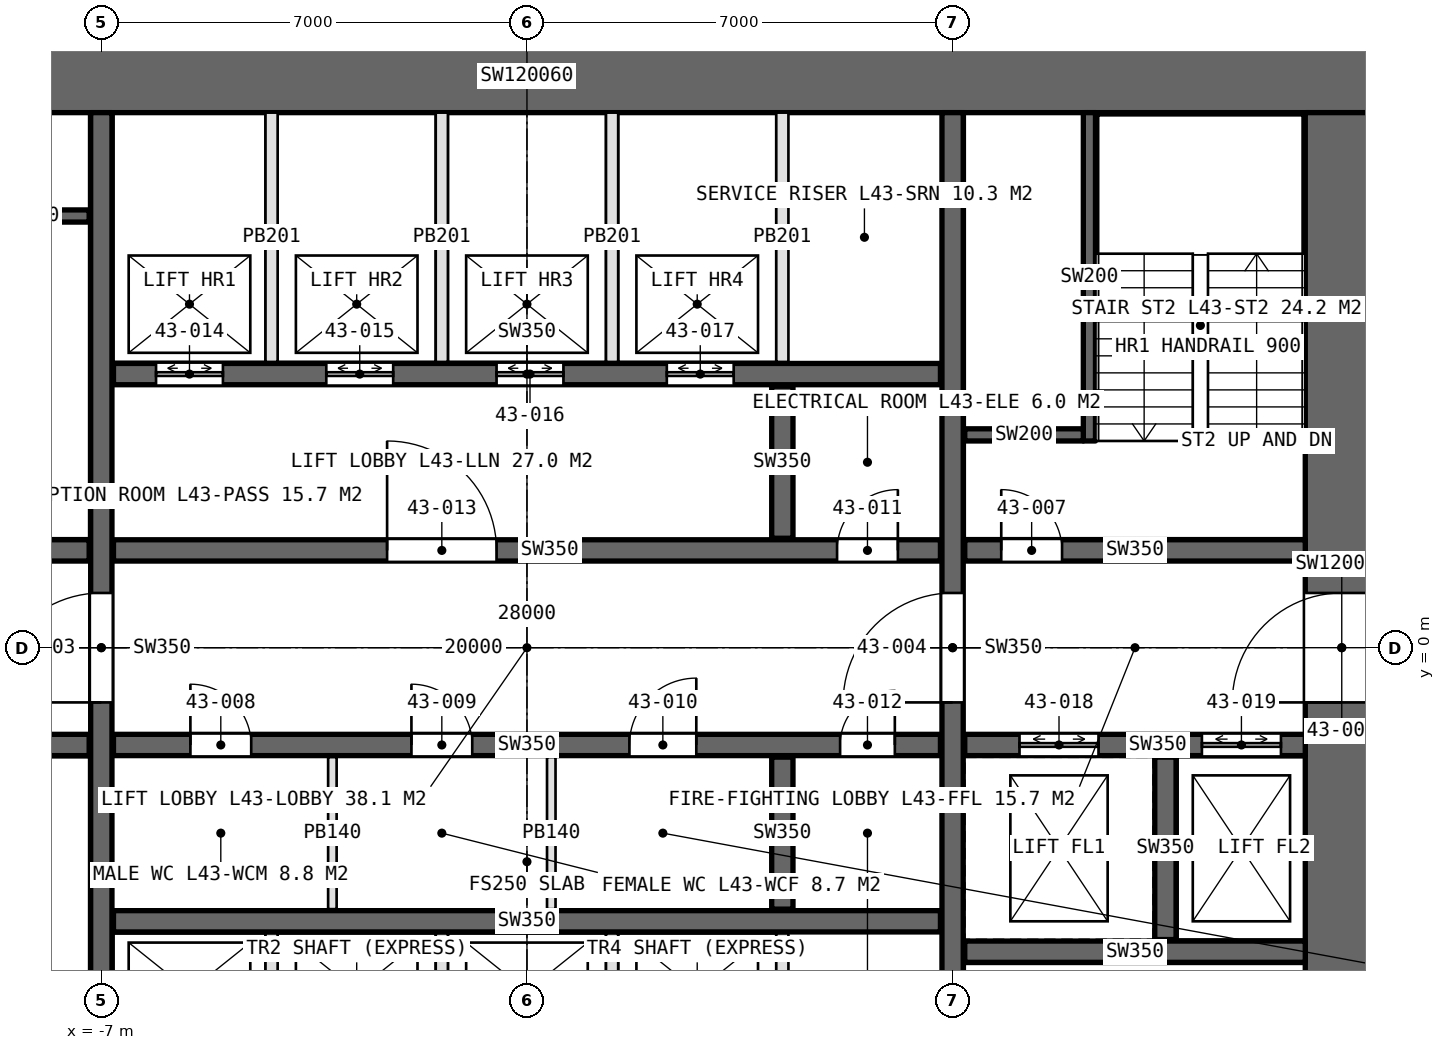
"""IFC4 building model, lengths in metres.
Left out: names, types, materials, properties, quantities, classifications, styles, units other than length and angle.
Written with IfcOpenShell. Run it as: python <this file> out.ifc"""

import sys

from ifc_helpers import new_model, si_unit, direction, frame, frame_2d, origin, place, context, subcontext, project, spatial, rectangle, extrude, element, fill, save


model = new_model("IFC4")
c1 = context("Model", 3, precision=1e-05, world=origin(), true_north=direction((0.0, 1.0)))
c2 = subcontext(c1, "Body", "Model", "MODEL_VIEW")
j1 = project(units=[si_unit("LENGTHUNIT", "METRE"), si_unit("PLANEANGLEUNIT", "RADIAN")], contexts=[c1])
p1 = place(None, origin())
s1 = spatial("IfcSite", under=j1, at=p1, CompositionType="ELEMENT")
p2 = place(p1, origin())
s2 = spatial("IfcBuilding", under=s1, at=p2, CompositionType="ELEMENT")
p3 = place(p2, frame((0.0, 0.0, 199.0)))
s3 = spatial("IfcBuildingStorey", under=s2, at=p3, CompositionType="ELEMENT", Elevation=199.0)
p4 = place(p3, frame((14.0, 9.4, 0.0), z_axis=(0.0, 0.0, 1.0), x_axis=(-1.0, 0.0, 0.0)))
e1 = element("IfcWall", 1, at=p4, inside=s3, PredefinedType="SHEAR", context=c2, shape_type="SweptSolid", body=[
    extrude(rectangle(XDim=28.0, YDim=1.2, at=frame_2d((14.0, 0.0))), origin(), (0.0, 0.0, 1.0), 4.2),
])
p5 = place(p4, frame((24.0, 0.0, 0.0)))
e2 = element("IfcOpeningElement", 2, at=p5, cuts=e1, PredefinedType="OPENING", context=c2, shape_type="SweptSolid", body=[
    extrude(rectangle(XDim=1.0, YDim=2.4, at=frame_2d((0.5, 1.2))), frame((0.0, 0.61, 0.0), z_axis=(0.0, -1.0, 0.0), x_axis=(1.0, 0.0, 0.0)), (0.0, 0.0, 1.0), 1.22),
])
p6 = place(p3, frame((13.4, -8.8, 0.0), z_axis=(0.0, 0.0, 1.0), x_axis=(0.0, 1.0, 0.0)))
e3 = element("IfcWall", 3, at=p6, inside=s3, PredefinedType="SHEAR", context=c2, shape_type="SweptSolid", body=[
    extrude(rectangle(XDim=17.6, YDim=1.2, at=frame_2d((8.8, 0.0))), origin(), (0.0, 0.0, 1.0), 4.2),
])
p7 = place(p6, frame((7.9, 0.0, 0.0)))
e4 = element("IfcOpeningElement", 4, at=p7, cuts=e3, PredefinedType="OPENING", context=c2, shape_type="SweptSolid", body=[
    extrude(rectangle(XDim=1.8, YDim=2.4, at=frame_2d((0.9, 1.2))), frame((0.0, 0.61, 0.0), z_axis=(0.0, -1.0, 0.0), x_axis=(1.0, 0.0, 0.0)), (0.0, 0.0, 1.0), 1.22),
])
p8 = place(p3, frame((-7.0, -8.8, 0.0), z_axis=(0.0, 0.0, 1.0), x_axis=(0.0, 1.0, 0.0)))
e5 = element("IfcWall", 5, at=p8, inside=s3, PredefinedType="SHEAR", context=c2, shape_type="SweptSolid", body=[
    extrude(rectangle(XDim=17.6, YDim=0.35, at=frame_2d((8.8, 0.0))), origin(), (0.0, 0.0, 1.0), 4.2),
])
p9 = place(p8, frame((7.9, 0.0, 0.0)))
e6 = element("IfcOpeningElement", 6, at=p9, cuts=e5, PredefinedType="OPENING", context=c2, shape_type="SweptSolid", body=[
    extrude(rectangle(XDim=1.8, YDim=2.4, at=frame_2d((0.9, 1.2))), frame((0.0, 0.185, 0.0), z_axis=(0.0, -1.0, 0.0), x_axis=(1.0, 0.0, 0.0)), (0.0, 0.0, 1.0), 0.37),
])
p10 = place(p3, frame((7.0, -8.8, 0.0), z_axis=(0.0, 0.0, 1.0), x_axis=(0.0, 1.0, 0.0)))
e7 = element("IfcWall", 7, at=p10, inside=s3, PredefinedType="SHEAR", context=c2, shape_type="SweptSolid", body=[
    extrude(rectangle(XDim=17.6, YDim=0.35, at=frame_2d((8.8, 0.0))), origin(), (0.0, 0.0, 1.0), 4.2),
])
p11 = place(p10, frame((7.9, 0.0, 0.0)))
e8 = element("IfcOpeningElement", 8, at=p11, cuts=e7, PredefinedType="OPENING", context=c2, shape_type="SweptSolid", body=[
    extrude(rectangle(XDim=1.8, YDim=2.4, at=frame_2d((0.9, 1.2))), frame((0.0, 0.185, 0.0), z_axis=(0.0, -1.0, 0.0), x_axis=(1.0, 0.0, 0.0)), (0.0, 0.0, 1.0), 0.37),
])
p12 = place(p3, frame((-6.8, 1.6, 0.0), z_axis=(0.0, 0.0, 1.0), x_axis=(1.0, 0.0, 0.0)))
e9 = element("IfcWall", 9, at=p12, inside=s3, PredefinedType="SHEAR", context=c2, shape_type="SweptSolid", body=[
    extrude(rectangle(XDim=13.6, YDim=0.35, at=frame_2d((6.8, 0.0))), origin(), (0.0, 0.0, 1.0), 4.2),
])
p13 = place(p12, frame((11.9, 0.0, 0.0)))
e10 = element("IfcOpeningElement", 10, at=p13, cuts=e9, PredefinedType="OPENING", context=c2, shape_type="SweptSolid", body=[
    extrude(rectangle(XDim=1.0, YDim=2.4, at=frame_2d((0.5, 1.2))), frame((0.0, 0.185, 0.0), z_axis=(0.0, -1.0, 0.0), x_axis=(1.0, 0.0, 0.0)), (0.0, 0.0, 1.0), 0.37),
])
p14 = place(p12, frame((4.5, 0.0, 0.0)))
e11 = element("IfcOpeningElement", 11, at=p14, cuts=e9, PredefinedType="OPENING", context=c2, shape_type="SweptSolid", body=[
    extrude(rectangle(XDim=1.8, YDim=2.4, at=frame_2d((0.9, 1.2))), frame((0.0, 0.185, 0.0), z_axis=(0.0, -1.0, 0.0), x_axis=(1.0, 0.0, 0.0)), (0.0, 0.0, 1.0), 0.37),
])
p15 = place(p3, frame((-6.8, -1.6, 0.0), z_axis=(0.0, 0.0, 1.0), x_axis=(1.0, 0.0, 0.0)))
e12 = element("IfcWall", 12, at=p15, inside=s3, PredefinedType="SHEAR", context=c2, shape_type="SweptSolid", body=[
    extrude(rectangle(XDim=13.6, YDim=0.35, at=frame_2d((6.8, 0.0))), origin(), (0.0, 0.0, 1.0), 4.2),
])
p16 = place(p15, frame((1.265, 0.0, 0.0)))
e13 = element("IfcOpeningElement", 13, at=p16, cuts=e12, PredefinedType="OPENING", context=c2, shape_type="SweptSolid", body=[
    extrude(rectangle(XDim=1.0, YDim=2.4, at=frame_2d((0.5, 1.2))), frame((0.0, 0.185, 0.0), z_axis=(0.0, -1.0, 0.0), x_axis=(1.0, 0.0, 0.0)), (0.0, 0.0, 1.0), 0.37),
])
p17 = place(p15, frame((4.9, 0.0, 0.0)))
e14 = element("IfcOpeningElement", 14, at=p17, cuts=e12, PredefinedType="OPENING", context=c2, shape_type="SweptSolid", body=[
    extrude(rectangle(XDim=1.0, YDim=2.4, at=frame_2d((0.5, 1.2))), frame((0.0, 0.185, 0.0), z_axis=(0.0, -1.0, 0.0), x_axis=(1.0, 0.0, 0.0)), (0.0, 0.0, 1.0), 0.37),
])
p18 = place(p15, frame((8.485, 0.0, 0.0)))
e15 = element("IfcOpeningElement", 15, at=p18, cuts=e12, PredefinedType="OPENING", context=c2, shape_type="SweptSolid", body=[
    extrude(rectangle(XDim=1.1, YDim=2.4, at=frame_2d((0.55, 1.2))), frame((0.0, 0.185, 0.0), z_axis=(0.0, -1.0, 0.0), x_axis=(1.0, 0.0, 0.0)), (0.0, 0.0, 1.0), 0.37),
])
p19 = place(p15, frame((11.95, 0.0, 0.0)))
e16 = element("IfcOpeningElement", 16, at=p19, cuts=e12, PredefinedType="OPENING", context=c2, shape_type="SweptSolid", body=[
    extrude(rectangle(XDim=0.9, YDim=2.4, at=frame_2d((0.45, 1.2))), frame((0.0, 0.185, 0.0), z_axis=(0.0, -1.0, 0.0), x_axis=(1.0, 0.0, 0.0)), (0.0, 0.0, 1.0), 0.37),
])
p20 = place(p3, frame((-6.8, 4.5, 0.0), z_axis=(0.0, 0.0, 1.0), x_axis=(1.0, 0.0, 0.0)))
e17 = element("IfcWall", 17, at=p20, inside=s3, PredefinedType="SHEAR", context=c2, shape_type="SweptSolid", body=[
    extrude(rectangle(XDim=13.6, YDim=0.35, at=frame_2d((6.8, 0.0))), origin(), (0.0, 0.0, 1.0), 4.2),
])
p21 = place(p20, frame((0.7, 0.0, 0.0)))
e18 = element("IfcOpeningElement", 18, at=p21, cuts=e17, PredefinedType="OPENING", context=c2, shape_type="SweptSolid", body=[
    extrude(rectangle(XDim=1.1, YDim=2.4, at=frame_2d((0.55, 1.2))), frame((0.0, 0.185, 0.0), z_axis=(0.0, -1.0, 0.0), x_axis=(1.0, 0.0, 0.0)), (0.0, 0.0, 1.0), 0.37),
])
p22 = place(p20, frame((3.5, 0.0, 0.0)))
e19 = element("IfcOpeningElement", 19, at=p22, cuts=e17, PredefinedType="OPENING", context=c2, shape_type="SweptSolid", body=[
    extrude(rectangle(XDim=1.1, YDim=2.4, at=frame_2d((0.55, 1.2))), frame((0.0, 0.185, 0.0), z_axis=(0.0, -1.0, 0.0), x_axis=(1.0, 0.0, 0.0)), (0.0, 0.0, 1.0), 0.37),
])
p23 = place(p20, frame((6.3, 0.0, 0.0)))
e20 = element("IfcOpeningElement", 20, at=p23, cuts=e17, PredefinedType="OPENING", context=c2, shape_type="SweptSolid", body=[
    extrude(rectangle(XDim=1.1, YDim=2.4, at=frame_2d((0.55, 1.2))), frame((0.0, 0.185, 0.0), z_axis=(0.0, -1.0, 0.0), x_axis=(1.0, 0.0, 0.0)), (0.0, 0.0, 1.0), 0.37),
])
p24 = place(p20, frame((9.1, 0.0, 0.0)))
e21 = element("IfcOpeningElement", 21, at=p24, cuts=e17, PredefinedType="OPENING", context=c2, shape_type="SweptSolid", body=[
    extrude(rectangle(XDim=1.1, YDim=2.4, at=frame_2d((0.55, 1.2))), frame((0.0, 0.185, 0.0), z_axis=(0.0, -1.0, 0.0), x_axis=(1.0, 0.0, 0.0)), (0.0, 0.0, 1.0), 0.37),
])
p25 = place(p3, frame((-6.8, -4.5, 0.0), z_axis=(0.0, 0.0, 1.0), x_axis=(1.0, 0.0, 0.0)))
e22 = element("IfcWall", 22, at=p25, inside=s3, PredefinedType="SHEAR", context=c2, shape_type="SweptSolid", body=[
    extrude(rectangle(XDim=13.6, YDim=0.35, at=frame_2d((6.8, 0.0))), origin(), (0.0, 0.0, 1.0), 4.2),
])
for number, where, z_axis, x_axis in (
    (23, (-12.8, 1.6, 0.0), (0.0, 0.0, 1.0), (1.0, 0.0, 0.0)),
    (24, (-12.8, -1.6, 0.0), (0.0, 0.0, 1.0), (1.0, 0.0, 0.0)),
):
    element("IfcWall", number, at=place(p3, frame(where, z_axis=z_axis, x_axis=x_axis)), inside=s3, PredefinedType="SHEAR", context=c2, shape_type="SweptSolid", body=[
        extrude(rectangle(XDim=5.6, YDim=0.35, at=frame_2d((2.8, 0.0))), origin(), (0.0, 0.0, 1.0), 4.2),
    ])
p26 = place(p3, frame((7.2, 1.6, 0.0), z_axis=(0.0, 0.0, 1.0), x_axis=(1.0, 0.0, 0.0)))
e25 = element("IfcWall", 25, at=p26, inside=s3, PredefinedType="SHEAR", context=c2, shape_type="SweptSolid", body=[
    extrude(rectangle(XDim=5.6, YDim=0.35, at=frame_2d((2.8, 0.0))), origin(), (0.0, 0.0, 1.0), 4.2),
])
p27 = place(p26, frame((0.6, 0.0, 0.0)))
e26 = element("IfcOpeningElement", 26, at=p27, cuts=e25, PredefinedType="OPENING", context=c2, shape_type="SweptSolid", body=[
    extrude(rectangle(XDim=1.0, YDim=2.4, at=frame_2d((0.5, 1.2))), frame((0.0, 0.185, 0.0), z_axis=(0.0, -1.0, 0.0), x_axis=(1.0, 0.0, 0.0)), (0.0, 0.0, 1.0), 0.37),
])
p28 = place(p3, frame((7.2, -1.6, 0.0), z_axis=(0.0, 0.0, 1.0), x_axis=(1.0, 0.0, 0.0)))
e27 = element("IfcWall", 27, at=p28, inside=s3, PredefinedType="SHEAR", context=c2, shape_type="SweptSolid", body=[
    extrude(rectangle(XDim=5.6, YDim=0.35, at=frame_2d((2.8, 0.0))), origin(), (0.0, 0.0, 1.0), 4.2),
])
p29 = place(p28, frame((0.9, 0.0, 0.0)))
e28 = element("IfcOpeningElement", 28, at=p29, cuts=e27, PredefinedType="OPENING", context=c2, shape_type="SweptSolid", body=[
    extrude(rectangle(XDim=1.3, YDim=2.4, at=frame_2d((0.65, 1.2))), frame((0.0, 0.185, 0.0), z_axis=(0.0, -1.0, 0.0), x_axis=(1.0, 0.0, 0.0)), (0.0, 0.0, 1.0), 0.37),
])
p30 = place(p28, frame((3.9, 0.0, 0.0)))
e29 = element("IfcOpeningElement", 29, at=p30, cuts=e27, PredefinedType="OPENING", context=c2, shape_type="SweptSolid", body=[
    extrude(rectangle(XDim=1.3, YDim=2.4, at=frame_2d((0.65, 1.2))), frame((0.0, 0.185, 0.0), z_axis=(0.0, -1.0, 0.0), x_axis=(1.0, 0.0, 0.0)), (0.0, 0.0, 1.0), 0.37),
])
p31 = place(p3, frame((10.5, -4.8, 0.0), z_axis=(0.0, 0.0, 1.0), x_axis=(0.0, 1.0, 0.0)))
e30 = element("IfcWall", 30, at=p31, inside=s3, PredefinedType="SHEAR", context=c2, shape_type="SweptSolid", body=[
    extrude(rectangle(XDim=3.0, YDim=0.35, at=frame_2d((1.5, 0.0))), origin(), (0.0, 0.0, 1.0), 4.2),
])
p32 = place(p3, frame((7.2, -5.0, 0.0), z_axis=(0.0, 0.0, 1.0), x_axis=(1.0, 0.0, 0.0)))
e31 = element("IfcWall", 31, at=p32, inside=s3, PredefinedType="SHEAR", context=c2, shape_type="SweptSolid", body=[
    extrude(rectangle(XDim=5.6, YDim=0.35, at=frame_2d((2.8, 0.0))), origin(), (0.0, 0.0, 1.0), 4.2),
])
for number, where, z_axis, x_axis in (
    (32, (4.2, 1.8, 0.0), (0.0, 0.0, 1.0), (0.0, 1.0, 0.0)),
    (33, (4.2, -4.3, 0.0), (0.0, 0.0, 1.0), (0.0, 1.0, 0.0)),
):
    element("IfcWall", number, at=place(p3, frame(where, z_axis=z_axis, x_axis=x_axis)), inside=s3, PredefinedType="SHEAR", context=c2, shape_type="SweptSolid", body=[
        extrude(rectangle(XDim=2.5, YDim=0.35, at=frame_2d((1.25, 0.0))), origin(), (0.0, 0.0, 1.0), 4.2),
    ])
for number, where, z_axis, x_axis in (
    (34, (-3.2, -1.8, 0.0), (0.0, 0.0, 1.0), (0.0, -1.0, 0.0)),
    (35, (0.4, -1.8, 0.0), (0.0, 0.0, 1.0), (0.0, -1.0, 0.0)),
):
    element("IfcWall", number, at=place(p3, frame(where, z_axis=z_axis, x_axis=x_axis)), inside=s3, PredefinedType="PARTITIONING", context=c2, shape_type="SweptSolid", body=[
        extrude(rectangle(XDim=2.5, YDim=0.14, at=frame_2d((1.25, 0.0))), origin(), (0.0, 0.0, 1.0), 3.95),
    ])
for number, where, z_axis, x_axis in (
    (36, (-4.2, 4.7, 0.0), (0.0, 0.0, 1.0), (0.0, 1.0, 0.0)),
    (37, (-1.4, 4.7, 0.0), (0.0, 0.0, 1.0), (0.0, 1.0, 0.0)),
    (38, (1.4, 4.7, 0.0), (0.0, 0.0, 1.0), (0.0, 1.0, 0.0)),
    (39, (4.2, 4.7, 0.0), (0.0, 0.0, 1.0), (0.0, 1.0, 0.0)),
    (40, (-4.2, -4.7, 0.0), (0.0, 0.0, 1.0), (0.0, -1.0, 0.0)),
    (41, (-1.4, -4.7, 0.0), (0.0, 0.0, 1.0), (0.0, -1.0, 0.0)),
    (42, (1.4, -4.7, 0.0), (0.0, 0.0, 1.0), (0.0, -1.0, 0.0)),
    (43, (4.2, -4.7, 0.0), (0.0, 0.0, 1.0), (0.0, -1.0, 0.0)),
):
    element("IfcWall", number, at=place(p3, frame(where, z_axis=z_axis, x_axis=x_axis)), inside=s3, PredefinedType="PARTITIONING", context=c2, shape_type="SweptSolid", body=[
        extrude(rectangle(XDim=4.1, YDim=0.2, at=frame_2d((2.05, 0.0))), origin(), (0.0, 0.0, 1.0), 4.2),
    ])
p33 = place(p3, frame((-9.15, 7.1, 0.0), z_axis=(0.0, 0.0, 1.0), x_axis=(1.0, 0.0, 0.0)))
e44 = element("IfcWall", 44, at=p33, inside=s3, PredefinedType="SOLIDWALL", context=c2, shape_type="SweptSolid", body=[
    extrude(rectangle(XDim=1.95, YDim=0.2, at=frame_2d((0.975, 0.0))), origin(), (0.0, 0.0, 1.0), 4.2),
])
p34 = place(p3, frame((9.25, 3.4, 0.0), z_axis=(0.0, 0.0, 1.0), x_axis=(0.0, 1.0, 0.0)))
e45 = element("IfcWall", 45, at=p34, inside=s3, PredefinedType="SOLIDWALL", context=c2, shape_type="SweptSolid", body=[
    extrude(rectangle(XDim=5.4, YDim=0.2, at=frame_2d((2.7, 0.0))), origin(), (0.0, 0.0, 1.0), 4.2),
])
p35 = place(p3, frame((9.15, 3.5, 0.0), z_axis=(0.0, 0.0, 1.0), x_axis=(-1.0, 0.0, 0.0)))
e46 = element("IfcWall", 46, at=p35, inside=s3, PredefinedType="SOLIDWALL", context=c2, shape_type="SweptSolid", body=[
    extrude(rectangle(XDim=1.95, YDim=0.2, at=frame_2d((0.975, 0.0))), origin(), (0.0, 0.0, 1.0), 4.2),
])
p36 = place(p7, origin())
e47 = element("IfcDoor", 47, at=p36, inside=s3, OperationType="DOUBLE_DOOR_SINGLE_SWING", PredefinedType="DOOR", context=c2, shape_type="SweptSolid", body=[
    extrude(rectangle(XDim=1.8, YDim=2.4, at=frame_2d((0.9, 1.2))), frame((0.0, 0.025, 0.0), z_axis=(0.0, -1.0, 0.0), x_axis=(1.0, 0.0, 0.0)), (0.0, 0.0, 1.0), 0.05),
])
fill(e4, e47)
p37 = place(p9, origin())
e48 = element("IfcDoor", 48, at=p37, inside=s3, OperationType="DOUBLE_DOOR_SINGLE_SWING", PredefinedType="DOOR", context=c2, shape_type="SweptSolid", body=[
    extrude(rectangle(XDim=1.8, YDim=2.4, at=frame_2d((0.9, 1.2))), frame((0.0, 0.025, 0.0), z_axis=(0.0, -1.0, 0.0), x_axis=(1.0, 0.0, 0.0)), (0.0, 0.0, 1.0), 0.05),
])
fill(e6, e48)
p38 = place(p11, origin())
e49 = element("IfcDoor", 49, at=p38, inside=s3, OperationType="DOUBLE_DOOR_SINGLE_SWING", PredefinedType="DOOR", context=c2, shape_type="SweptSolid", body=[
    extrude(rectangle(XDim=1.8, YDim=2.4, at=frame_2d((0.9, 1.2))), frame((0.0, 0.025, 0.0), z_axis=(0.0, -1.0, 0.0), x_axis=(1.0, 0.0, 0.0)), (0.0, 0.0, 1.0), 0.05),
])
fill(e8, e49)
p39 = place(p27, origin())
e50 = element("IfcDoor", 50, at=p39, inside=s3, OperationType="SINGLE_SWING_LEFT", PredefinedType="DOOR", context=c2, shape_type="SweptSolid", body=[
    extrude(rectangle(XDim=1.0, YDim=2.4, at=frame_2d((0.5, 1.2))), frame((0.0, 0.025, 0.0), z_axis=(0.0, -1.0, 0.0), x_axis=(1.0, 0.0, 0.0)), (0.0, 0.0, 1.0), 0.05),
])
fill(e26, e50)
p40 = place(p16, origin())
e51 = element("IfcDoor", 51, at=p40, inside=s3, OperationType="SINGLE_SWING_LEFT", PredefinedType="DOOR", context=c2, shape_type="SweptSolid", body=[
    extrude(rectangle(XDim=1.0, YDim=2.4, at=frame_2d((0.5, 1.2))), frame((0.0, 0.025, 0.0), z_axis=(0.0, -1.0, 0.0), x_axis=(1.0, 0.0, 0.0)), (0.0, 0.0, 1.0), 0.05),
])
fill(e13, e51)
p41 = place(p17, origin())
e52 = element("IfcDoor", 52, at=p41, inside=s3, OperationType="SINGLE_SWING_LEFT", PredefinedType="DOOR", context=c2, shape_type="SweptSolid", body=[
    extrude(rectangle(XDim=1.0, YDim=2.4, at=frame_2d((0.5, 1.2))), frame((0.0, 0.025, 0.0), z_axis=(0.0, -1.0, 0.0), x_axis=(1.0, 0.0, 0.0)), (0.0, 0.0, 1.0), 0.05),
])
fill(e14, e52)
p42 = place(p18, origin())
e53 = element("IfcDoor", 53, at=p42, inside=s3, OperationType="SINGLE_SWING_RIGHT", PredefinedType="DOOR", context=c2, shape_type="SweptSolid", body=[
    extrude(rectangle(XDim=1.1, YDim=2.4, at=frame_2d((0.55, 1.2))), frame((0.0, 0.025, 0.0), z_axis=(0.0, -1.0, 0.0), x_axis=(1.0, 0.0, 0.0)), (0.0, 0.0, 1.0), 0.05),
])
fill(e15, e53)
p43 = place(p13, origin())
e54 = element("IfcDoor", 54, at=p43, inside=s3, OperationType="SINGLE_SWING_RIGHT", PredefinedType="DOOR", context=c2, shape_type="SweptSolid", body=[
    extrude(rectangle(XDim=1.0, YDim=2.4, at=frame_2d((0.5, 1.2))), frame((0.0, 0.025, 0.0), z_axis=(0.0, -1.0, 0.0), x_axis=(1.0, 0.0, 0.0)), (0.0, 0.0, 1.0), 0.05),
])
fill(e10, e54)
p44 = place(p19, origin())
e55 = element("IfcDoor", 55, at=p44, inside=s3, OperationType="SINGLE_SWING_RIGHT", PredefinedType="DOOR", context=c2, shape_type="SweptSolid", body=[
    extrude(rectangle(XDim=0.9, YDim=2.4, at=frame_2d((0.45, 1.2))), frame((0.0, 0.025, 0.0), z_axis=(0.0, -1.0, 0.0), x_axis=(1.0, 0.0, 0.0)), (0.0, 0.0, 1.0), 0.05),
])
fill(e16, e55)
p45 = place(p14, origin())
e56 = element("IfcDoor", 56, at=p45, inside=s3, OperationType="DOUBLE_DOOR_SINGLE_SWING", PredefinedType="DOOR", context=c2, shape_type="SweptSolid", body=[
    extrude(rectangle(XDim=1.8, YDim=2.4, at=frame_2d((0.9, 1.2))), frame((0.0, 0.025, 0.0), z_axis=(0.0, -1.0, 0.0), x_axis=(1.0, 0.0, 0.0)), (0.0, 0.0, 1.0), 0.05),
])
fill(e11, e56)
p46 = place(p21, origin())
e57 = element("IfcDoor", 57, at=p46, inside=s3, OperationType="DOUBLE_DOOR_SLIDING", PredefinedType="DOOR", context=c2, shape_type="SweptSolid", body=[
    extrude(rectangle(XDim=1.1, YDim=2.4, at=frame_2d((0.55, 1.2))), frame((0.0, 0.025, 0.0), z_axis=(0.0, -1.0, 0.0), x_axis=(1.0, 0.0, 0.0)), (0.0, 0.0, 1.0), 0.05),
])
fill(e18, e57)
p47 = place(p22, origin())
e58 = element("IfcDoor", 58, at=p47, inside=s3, OperationType="DOUBLE_DOOR_SLIDING", PredefinedType="DOOR", context=c2, shape_type="SweptSolid", body=[
    extrude(rectangle(XDim=1.1, YDim=2.4, at=frame_2d((0.55, 1.2))), frame((0.0, 0.025, 0.0), z_axis=(0.0, -1.0, 0.0), x_axis=(1.0, 0.0, 0.0)), (0.0, 0.0, 1.0), 0.05),
])
fill(e19, e58)
p48 = place(p23, origin())
e59 = element("IfcDoor", 59, at=p48, inside=s3, OperationType="DOUBLE_DOOR_SLIDING", PredefinedType="DOOR", context=c2, shape_type="SweptSolid", body=[
    extrude(rectangle(XDim=1.1, YDim=2.4, at=frame_2d((0.55, 1.2))), frame((0.0, 0.025, 0.0), z_axis=(0.0, -1.0, 0.0), x_axis=(1.0, 0.0, 0.0)), (0.0, 0.0, 1.0), 0.05),
])
fill(e20, e59)
p49 = place(p24, origin())
e60 = element("IfcDoor", 60, at=p49, inside=s3, OperationType="DOUBLE_DOOR_SLIDING", PredefinedType="DOOR", context=c2, shape_type="SweptSolid", body=[
    extrude(rectangle(XDim=1.1, YDim=2.4, at=frame_2d((0.55, 1.2))), frame((0.0, 0.025, 0.0), z_axis=(0.0, -1.0, 0.0), x_axis=(1.0, 0.0, 0.0)), (0.0, 0.0, 1.0), 0.05),
])
fill(e21, e60)
p50 = place(p29, origin())
e61 = element("IfcDoor", 61, at=p50, inside=s3, OperationType="DOUBLE_DOOR_SLIDING", PredefinedType="DOOR", context=c2, shape_type="SweptSolid", body=[
    extrude(rectangle(XDim=1.3, YDim=2.4, at=frame_2d((0.65, 1.2))), frame((0.0, 0.025, 0.0), z_axis=(0.0, -1.0, 0.0), x_axis=(1.0, 0.0, 0.0)), (0.0, 0.0, 1.0), 0.05),
])
fill(e28, e61)
p51 = place(p30, origin())
e62 = element("IfcDoor", 62, at=p51, inside=s3, OperationType="DOUBLE_DOOR_SLIDING", PredefinedType="DOOR", context=c2, shape_type="SweptSolid", body=[
    extrude(rectangle(XDim=1.3, YDim=2.4, at=frame_2d((0.65, 1.2))), frame((0.0, 0.025, 0.0), z_axis=(0.0, -1.0, 0.0), x_axis=(1.0, 0.0, 0.0)), (0.0, 0.0, 1.0), 0.05),
])
fill(e29, e62)
save(model, sys.argv[1])
